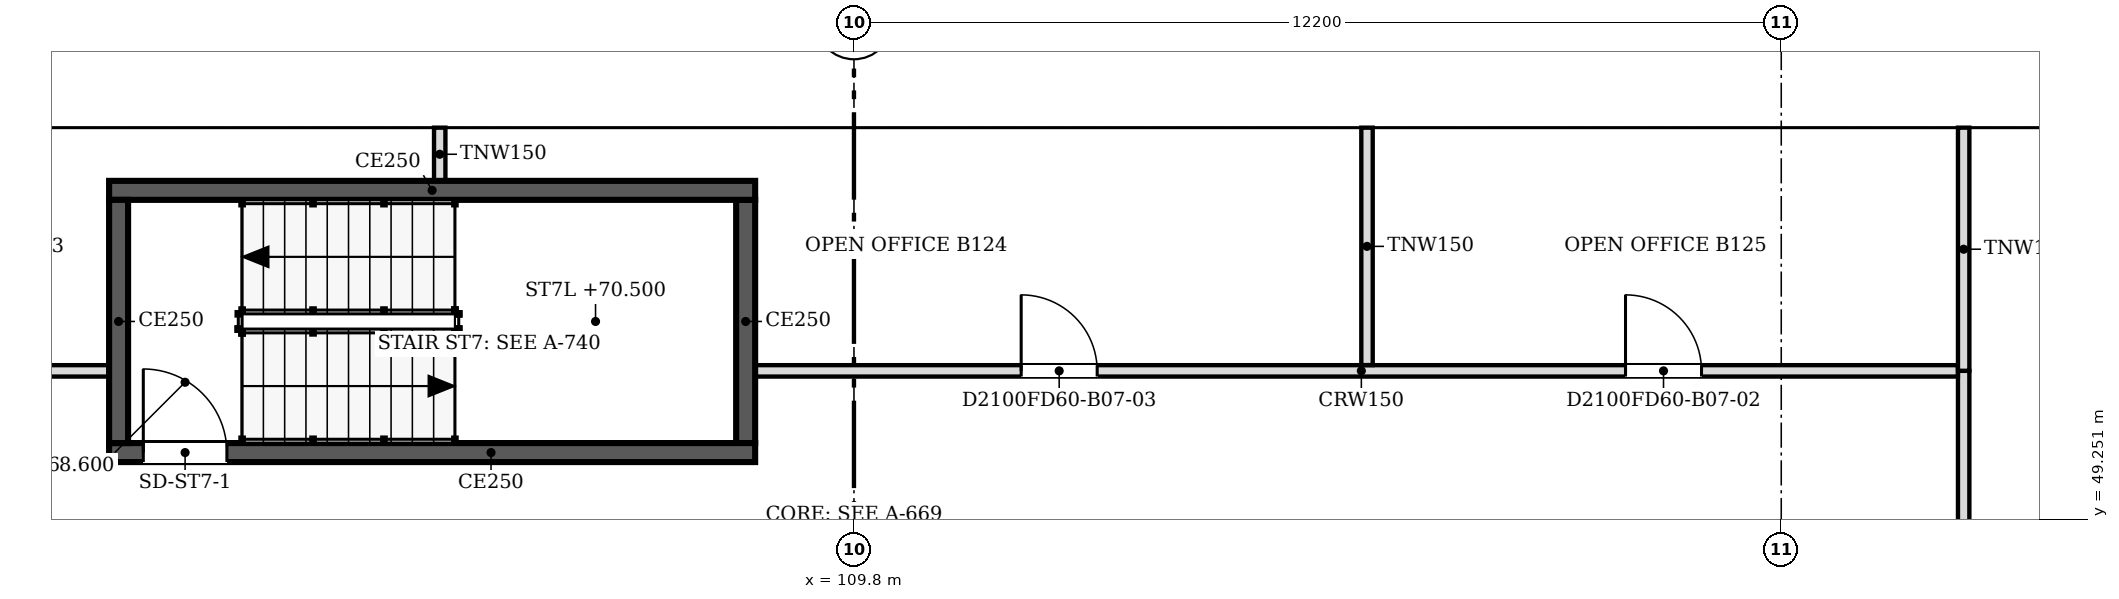
"""IFC4 building model, lengths in metres.
Left out: names, types, materials, properties, quantities, classifications, styles, units other than length and angle.
Written with IfcOpenShell. Run it as: python <this file> out.ifc"""

import sys

from ifc_helpers import new_model, si_unit, direction, frame, frame_2d, origin, place, context, subcontext, project, spatial, polyline, rectangle, outline, extrude, faceted_brep, source, transform, mapped, element, fill, save


model = new_model("IFC4")
c1 = context("Model", 3, precision=1e-05, world=origin(), true_north=direction((0.0, 1.0)))
c2 = subcontext(c1, "Body", "Model", "MODEL_VIEW")
j1 = project(units=[si_unit("LENGTHUNIT", "METRE"), si_unit("PLANEANGLEUNIT", "RADIAN")], contexts=[c1])
p1 = place(None, origin())
s1 = spatial("IfcSite", under=j1, at=p1, CompositionType="ELEMENT")
p2 = place(p1, origin())
s2 = spatial("IfcBuilding", under=s1, at=p2, CompositionType="ELEMENT")
p3 = place(p2, frame((0.0, 0.0, 68.6)))
s3 = spatial("IfcBuildingStorey", under=s2, at=p3, CompositionType="ELEMENT", Elevation=68.6)
m1 = source(origin(), c2, "Body", "Brep", [
    faceted_brep([(3.05, -0.25, 0.0), (0.047, -0.25, 3.8), (0.0, -0.25, 3.74), (0.0, -0.25, 0.0), (0.093, 0.25, 3.741), (3.05, 0.25, 0.0), (0.093, 0.25, 0.0), (0.047, 0.0, 3.8)], [[[0, 1, 2, 3]], [[4, 5, 6]], [[5, 4, 7, 1, 0]], [[2, 1, 7]], [[6, 5, 0, 3]], [[6, 3, 2, 7, 4]]]),
])
p4 = place(p3, frame((128.1, 54.65, 0.0), z_axis=(0.0, 0.0, 1.0), x_axis=(-1.0, 0.0, 0.0)))
e1 = element("IfcWall", 1, at=p4, inside=s3, PredefinedType="SOLIDWALL", context=c2, shape_type="MappedRepresentation", body=[
    mapped(m1, transform((0.0, 0.0, 0.0), scale=1.0)),
])
m2 = source(origin(), c2, "Body", "SweptSolid", [
    extrude(outline(polyline([(2.534, 0.25), (0.247, 3.144), (0.247, 0.25), (2.534, 0.25)])), frame((0.0, 0.26, 0.0), z_axis=(0.0, -1.0, 0.0), x_axis=(1.0, 0.0, 0.0)), (0.0, 0.0, 1.0), 0.52),
])
p5 = place(p4, origin())
e2 = element("IfcOpeningElement", 2, at=p5, cuts=e1, PredefinedType="OPENING", context=c2, shape_type="MappedRepresentation", body=[
    mapped(m2, transform((0.0, 0.0, 0.0), scale=1.0)),
])
m3 = source(origin(), c2, "Body", "SweptSolid", [
    extrude(outline(polyline([(6.1, 0.0), (3.05, 3.8), (0.0, 0.0), (6.1, 0.0)])), frame((0.0, 0.25, 0.0), z_axis=(0.0, -1.0, 0.0), x_axis=(1.0, 0.0, 0.0)), (0.0, 0.0, 1.0), 0.5),
])
p6 = place(p3, frame((125.05, 54.65, 0.0), z_axis=(0.0, 0.0, 1.0), x_axis=(-1.0, 0.0, 0.0)))
e3 = element("IfcWall", 3, at=p6, inside=s3, PredefinedType="SOLIDWALL", context=c2, shape_type="MappedRepresentation", body=[
    mapped(m3, transform((0.0, 0.0, 0.0), scale=1.0)),
])
m4 = source(origin(), c2, "Body", "SweptSolid", [
    extrude(outline(polyline([(5.579, 0.25), (3.05, 3.4), (0.521, 0.25), (5.579, 0.25)])), frame((0.0, 0.26, 0.0), z_axis=(0.0, -1.0, 0.0), x_axis=(1.0, 0.0, 0.0)), (0.0, 0.0, 1.0), 0.52),
])
p7 = place(p6, origin())
e4 = element("IfcOpeningElement", 4, at=p7, cuts=e3, PredefinedType="OPENING", context=c2, shape_type="MappedRepresentation", body=[
    mapped(m4, transform((0.0, 0.0, 0.0), scale=1.0)),
])
m5 = source(origin(), c2, "Body", "Brep", [
    faceted_brep([(6.1, -0.25, 0.0), (3.05, -0.25, 3.8), (0.0, -0.25, 0.0), (6.1, -0.25, 0.0), (0.0, 0.25, 0.0), (3.05, 0.25, 3.8), (6.1, 0.25, 0.0), (6.1, 0.25, 0.0)], [[[0, 1, 2, 3]], [[4, 5, 6, 7]], [[6, 5, 1, 0]], [[5, 4, 2, 1]], [[4, 7, 3, 2]], [[3, 7, 6, 0]]]),
])
p8 = place(p3, frame((118.95, 54.65, 0.0), z_axis=(0.0, 0.0, 1.0), x_axis=(-1.0, 0.0, 0.0)))
e5 = element("IfcWall", 5, at=p8, inside=s3, PredefinedType="SOLIDWALL", context=c2, shape_type="MappedRepresentation", body=[
    mapped(m5, transform((0.0, 0.0, 0.0), scale=1.0)),
])
p9 = place(p8, origin())
e6 = element("IfcOpeningElement", 6, at=p9, cuts=e5, PredefinedType="OPENING", context=c2, shape_type="MappedRepresentation", body=[
    mapped(m4, transform((0.0, 0.0, 0.0), scale=1.0)),
])
p10 = place(p3, frame((112.85, 54.65, 0.0), z_axis=(0.0, 0.0, 1.0), x_axis=(-1.0, 0.0, 0.0)))
e7 = element("IfcWall", 7, at=p10, inside=s3, PredefinedType="SOLIDWALL", context=c2, shape_type="MappedRepresentation", body=[
    mapped(m3, transform((0.0, 0.0, 0.0), scale=1.0)),
])
p11 = place(p10, origin())
e8 = element("IfcOpeningElement", 8, at=p11, cuts=e7, PredefinedType="OPENING", context=c2, shape_type="MappedRepresentation", body=[
    mapped(m4, transform((0.0, 0.0, 0.0), scale=1.0)),
])
p12 = place(p3, frame((106.75, 54.65, 0.0), z_axis=(0.0, 0.0, 1.0), x_axis=(-1.0, 0.0, 0.0)))
e9 = element("IfcWall", 9, at=p12, inside=s3, PredefinedType="SOLIDWALL", context=c2, shape_type="MappedRepresentation", body=[
    mapped(m3, transform((0.0, 0.0, 0.0), scale=1.0)),
])
p13 = place(p12, origin())
e10 = element("IfcOpeningElement", 10, at=p13, cuts=e9, PredefinedType="OPENING", context=c2, shape_type="MappedRepresentation", body=[
    mapped(m4, transform((0.0, 0.0, 0.0), scale=1.0)),
])
p14 = place(p3, frame((100.65, 54.65, 0.0), z_axis=(0.0, 0.0, 1.0), x_axis=(-1.0, 0.0, 0.0)))
e11 = element("IfcWall", 11, at=p14, inside=s3, PredefinedType="SOLIDWALL", context=c2, shape_type="MappedRepresentation", body=[
    mapped(m5, transform((0.0, 0.0, 0.0), scale=1.0)),
])
p15 = place(p14, origin())
e12 = element("IfcOpeningElement", 12, at=p15, cuts=e11, PredefinedType="OPENING", context=c2, shape_type="MappedRepresentation", body=[
    mapped(m4, transform((0.0, 0.0, 0.0), scale=1.0)),
])
p16 = place(p2, frame((0.0, 0.0, 72.4)))
s4 = spatial("IfcBuildingStorey", under=s2, at=p16, CompositionType="ELEMENT", Elevation=72.4)
m6 = source(origin(), c2, "Body", "Brep", [
    faceted_brep([(3.003, -0.25, 0.0), (6.053, -0.25, 3.8), (3.003, -0.25, 7.6), (0.0, -0.25, 3.8), (0.047, 0.25, 3.859), (3.003, 0.25, 7.6), (6.053, 0.25, 3.8), (3.003, 0.25, 0.0), (0.047, 0.25, 3.741), (0.0, 0.0, 3.8)], [[[0, 1, 2, 3]], [[4, 5, 6, 7, 8]], [[7, 6, 1, 0]], [[6, 5, 2, 1]], [[5, 4, 9, 3, 2]], [[8, 7, 0, 3, 9]], [[8, 9, 4]]]),
])
p17 = place(p16, frame((128.053, 54.65, -3.8), z_axis=(0.0, 0.0, 1.0), x_axis=(-1.0, 0.0, 0.0)))
e13 = element("IfcWall", 13, at=p17, inside=s4, PredefinedType="SOLIDWALL", context=c2, shape_type="MappedRepresentation", body=[
    mapped(m6, transform((0.0, 0.0, 0.0), scale=1.0)),
])
m7 = source(origin(), c2, "Body", "SweptSolid", [
    extrude(outline(polyline([(3.005, 0.401), (5.733, 3.8), (3.005, 7.199), (0.319, 3.8), (3.005, 0.401)])), frame((0.0, 0.26, 0.0), z_axis=(0.0, -1.0, 0.0), x_axis=(1.0, 0.0, 0.0)), (0.0, 0.0, 1.0), 0.52),
])
p18 = place(p17, origin())
e14 = element("IfcOpeningElement", 14, at=p18, cuts=e13, PredefinedType="OPENING", context=c2, shape_type="MappedRepresentation", body=[
    mapped(m7, transform((0.0, 0.0, 0.0), scale=1.0)),
])
m8 = source(origin(), c2, "Body", "SweptSolid", [
    extrude(outline(polyline([(3.05, 0.0), (6.1, 3.8), (3.05, 7.6), (0.0, 3.8), (3.05, 0.0)])), frame((0.0, 0.25, 0.0), z_axis=(0.0, -1.0, 0.0), x_axis=(1.0, 0.0, 0.0)), (0.0, 0.0, 1.0), 0.5),
])
p19 = place(p16, frame((122.0, 54.65, -3.8), z_axis=(0.0, 0.0, 1.0), x_axis=(-1.0, 0.0, 0.0)))
e15 = element("IfcWall", 15, at=p19, inside=s4, PredefinedType="SOLIDWALL", context=c2, shape_type="MappedRepresentation", body=[
    mapped(m8, transform((0.0, 0.0, 0.0), scale=1.0)),
])
m9 = source(origin(), c2, "Body", "SweptSolid", [
    extrude(outline(polyline([(3.05, 0.399), (5.78, 3.8), (3.05, 7.2), (0.321, 3.8), (3.05, 0.399)])), frame((0.0, 0.26, 0.0), z_axis=(0.0, -1.0, 0.0), x_axis=(1.0, 0.0, 0.0)), (0.0, 0.0, 1.0), 0.52),
])
p20 = place(p19, origin())
e16 = element("IfcOpeningElement", 16, at=p20, cuts=e15, PredefinedType="OPENING", context=c2, shape_type="MappedRepresentation", body=[
    mapped(m9, transform((0.0, 0.0, 0.0), scale=1.0)),
])
m10 = source(origin(), c2, "Body", "Brep", [
    faceted_brep([(3.05, -0.25, 0.0), (6.1, -0.25, 3.8), (6.1, -0.25, 3.8), (3.05, -0.25, 7.6), (0.0, -0.25, 3.8), (0.0, 0.25, 3.8), (3.05, 0.25, 7.6), (6.1, 0.25, 3.8), (6.1, 0.25, 3.8), (3.05, 0.25, 0.0)], [[[0, 1, 2, 3, 4]], [[5, 6, 7, 8, 9]], [[9, 8, 1, 0]], [[7, 6, 3, 2]], [[6, 5, 4, 3]], [[5, 9, 0, 4]], [[1, 8, 7, 2]]]),
])
p21 = place(p16, frame((115.9, 54.65, -3.8), z_axis=(0.0, 0.0, 1.0), x_axis=(-1.0, 0.0, 0.0)))
e17 = element("IfcWall", 17, at=p21, inside=s4, PredefinedType="SOLIDWALL", context=c2, shape_type="MappedRepresentation", body=[
    mapped(m10, transform((0.0, 0.0, 0.0), scale=1.0)),
])
p22 = place(p21, origin())
e18 = element("IfcOpeningElement", 18, at=p22, cuts=e17, PredefinedType="OPENING", context=c2, shape_type="MappedRepresentation", body=[
    mapped(m9, transform((0.0, 0.0, 0.0), scale=1.0)),
])
p23 = place(p16, frame((109.8, 54.65, -3.8), z_axis=(0.0, 0.0, 1.0), x_axis=(-1.0, 0.0, 0.0)))
e19 = element("IfcWall", 19, at=p23, inside=s4, PredefinedType="SOLIDWALL", context=c2, shape_type="MappedRepresentation", body=[
    mapped(m8, transform((0.0, 0.0, 0.0), scale=1.0)),
])
p24 = place(p23, origin())
e20 = element("IfcOpeningElement", 20, at=p24, cuts=e19, PredefinedType="OPENING", context=c2, shape_type="MappedRepresentation", body=[
    mapped(m9, transform((0.0, 0.0, 0.0), scale=1.0)),
])
p25 = place(p16, frame((103.7, 54.65, -3.8), z_axis=(0.0, 0.0, 1.0), x_axis=(-1.0, 0.0, 0.0)))
e21 = element("IfcWall", 21, at=p25, inside=s4, PredefinedType="SOLIDWALL", context=c2, shape_type="MappedRepresentation", body=[
    mapped(m10, transform((0.0, 0.0, 0.0), scale=1.0)),
])
p26 = place(p25, origin())
e22 = element("IfcOpeningElement", 22, at=p26, cuts=e21, PredefinedType="OPENING", context=c2, shape_type="MappedRepresentation", body=[
    mapped(m9, transform((0.0, 0.0, 0.0), scale=1.0)),
])
p27 = place(p3, frame((108.5, 50.125, 0.0), z_axis=(0.0, 0.0, 1.0), x_axis=(-1.0, 0.0, 0.0)))
e23 = element("IfcWall", 23, at=p27, inside=s3, PredefinedType="SOLIDWALL", context=c2, shape_type="SweptSolid", body=[
    extrude(rectangle(XDim=8.5, YDim=0.25, at=frame_2d((4.25, 0.0))), origin(), (0.0, 0.0, 1.0), 3.8),
])
m11 = source(origin(), c2, "Body", "SweptSolid", [
    extrude(rectangle(XDim=1.1, YDim=2.1, at=frame_2d((0.55, 1.05))), frame((0.0, 0.135, 0.0), z_axis=(0.0, -1.0, 0.0), x_axis=(1.0, 0.0, 0.0)), (0.0, 0.0, 1.0), 0.27),
])
p28 = place(p27, frame((6.95, 0.0, 0.0)))
e24 = element("IfcOpeningElement", 24, at=p28, cuts=e23, PredefinedType="OPENING", context=c2, shape_type="MappedRepresentation", body=[
    mapped(m11, transform((0.0, 0.0, 0.0), scale=1.0)),
])
p29 = place(p3, frame((100.125, 50.25, 0.0), z_axis=(0.0, 0.0, 1.0), x_axis=(0.0, 1.0, 0.0)))
e25 = element("IfcWall", 25, at=p29, inside=s3, PredefinedType="SOLIDWALL", context=c2, shape_type="SweptSolid", body=[
    extrude(rectangle(XDim=3.2, YDim=0.25, at=frame_2d((1.6, 0.0))), origin(), (0.0, 0.0, 1.0), 3.8),
])
p30 = place(p3, frame((100.0, 53.575, 0.0), z_axis=(0.0, 0.0, 1.0), x_axis=(1.0, 0.0, 0.0)))
e26 = element("IfcWall", 26, at=p30, inside=s3, PredefinedType="SOLIDWALL", context=c2, shape_type="SweptSolid", body=[
    extrude(rectangle(XDim=8.5, YDim=0.25, at=frame_2d((4.25, 0.0))), origin(), (0.0, 0.0, 1.0), 3.8),
])
p31 = place(p3, frame((108.375, 53.45, 0.0), z_axis=(0.0, 0.0, 1.0), x_axis=(0.0, -1.0, 0.0)))
e27 = element("IfcWall", 27, at=p31, inside=s3, PredefinedType="SOLIDWALL", context=c2, shape_type="SweptSolid", body=[
    extrude(rectangle(XDim=3.2, YDim=0.25, at=frame_2d((1.6, 0.0))), origin(), (0.0, 0.0, 1.0), 3.8),
])
p32 = place(p3, frame((124.4, 51.2, 0.0), z_axis=(0.0, 0.0, 1.0), x_axis=(0.0, -1.0, 0.0)))
e28 = element("IfcWall", 28, at=p32, inside=s3, PredefinedType="PARTITIONING", context=c2, shape_type="SweptSolid", body=[
    extrude(rectangle(XDim=14.6, YDim=0.15, at=frame_2d((7.3, 0.0))), origin(), (0.0, 0.0, 1.0), 3.067),
])
m12 = source(origin(), c2, "Body", "SweptSolid", [
    extrude(rectangle(XDim=0.9, YDim=2.1, at=frame_2d((0.45, 1.05))), frame((0.0, 0.085, 0.0), z_axis=(0.0, -1.0, 0.0), x_axis=(1.0, 0.0, 0.0)), (0.0, 0.0, 1.0), 0.17),
])
p33 = place(p32, frame((3.9, 0.0, 0.0)))
e29 = element("IfcOpeningElement", 29, at=p33, cuts=e28, PredefinedType="OPENING", context=c2, shape_type="MappedRepresentation", body=[
    mapped(m12, transform((0.0, 0.0, 0.0), scale=1.0)),
])
m13 = source(origin(), c2, "Body", "SweptSolid", [
    extrude(rectangle(XDim=1.8, YDim=2.1, at=frame_2d((0.9, 1.05))), frame((0.0, 0.085, 0.0), z_axis=(0.0, -1.0, 0.0), x_axis=(1.0, 0.0, 0.0)), (0.0, 0.0, 1.0), 0.17),
])
p34 = place(p32, frame((10.7, 0.0, 0.0)))
e30 = element("IfcOpeningElement", 30, at=p34, cuts=e28, PredefinedType="OPENING", context=c2, shape_type="MappedRepresentation", body=[
    mapped(m13, transform((0.0, 0.0, 0.0), scale=1.0)),
])
p35 = place(p3, frame((95.276, 51.2, 0.0), z_axis=(0.0, 0.0, 1.0), x_axis=(1.0, 0.0, 0.0)))
e31 = element("IfcWall", 31, at=p35, inside=s3, PredefinedType="PARTITIONING", context=c2, shape_type="SweptSolid", body=[
    extrude(rectangle(XDim=4.724, YDim=0.15, at=frame_2d((2.362, 0.0))), origin(), (0.0, 0.0, 1.0), 3.067),
])
m14 = source(origin(), c2, "Body", "SweptSolid", [
    extrude(rectangle(XDim=1.0, YDim=2.1, at=frame_2d((0.5, 1.05))), frame((0.0, 0.085, 0.0), z_axis=(0.0, -1.0, 0.0), x_axis=(1.0, 0.0, 0.0)), (0.0, 0.0, 1.0), 0.17),
])
p36 = place(p35, frame((1.9, 0.0, 0.0)))
e32 = element("IfcOpeningElement", 32, at=p36, cuts=e31, PredefinedType="OPENING", context=c2, shape_type="MappedRepresentation", body=[
    mapped(m14, transform((0.0, 0.0, 0.0), scale=1.0)),
])
p37 = place(p3, frame((108.5, 51.2, 0.0), z_axis=(0.0, 0.0, 1.0), x_axis=(1.0, 0.0, 0.0)))
e33 = element("IfcWall", 33, at=p37, inside=s3, PredefinedType="PARTITIONING", context=c2, shape_type="SweptSolid", body=[
    extrude(rectangle(XDim=15.824, YDim=0.15, at=frame_2d((7.912, 0.0))), origin(), (0.0, 0.0, 1.0), 3.067),
])
p38 = place(p37, frame((11.451, 0.0, 0.0)))
e34 = element("IfcOpeningElement", 34, at=p38, cuts=e33, PredefinedType="OPENING", context=c2, shape_type="MappedRepresentation", body=[
    mapped(m14, transform((0.0, 0.0, 0.0), scale=1.0)),
])
p39 = place(p37, frame((3.5, 0.0, 0.0)))
e35 = element("IfcOpeningElement", 35, at=p39, cuts=e33, PredefinedType="OPENING", context=c2, shape_type="MappedRepresentation", body=[
    mapped(m14, transform((0.0, 0.0, 0.0), scale=1.0)),
])
p40 = place(p3, frame((124.4, 51.201, 0.0), z_axis=(0.0, 0.0, 1.0), x_axis=(0.0, 1.0, 0.0)))
e36 = element("IfcWall", 36, at=p40, inside=s3, PredefinedType="PARTITIONING", context=c2, shape_type="SweptSolid", body=[
    extrude(rectangle(XDim=3.199, YDim=0.15, at=frame_2d((1.6, 0.0))), origin(), (0.0, 0.0, 1.0), 3.067),
])
p41 = place(p3, frame((116.55, 51.276, 0.0), z_axis=(0.0, 0.0, 1.0), x_axis=(0.0, 1.0, 0.0)))
e37 = element("IfcWall", 37, at=p41, inside=s3, PredefinedType="PARTITIONING", context=c2, shape_type="SweptSolid", body=[
    extrude(rectangle(XDim=3.124, YDim=0.15, at=frame_2d((1.562, 0.0))), origin(), (0.0, 0.0, 1.0), 3.067),
])
p42 = place(p3, frame((104.35, 53.7, 0.0), z_axis=(0.0, 0.0, 1.0), x_axis=(0.0, 1.0, 0.0)))
e38 = element("IfcWall", 38, at=p42, inside=s3, PredefinedType="PARTITIONING", context=c2, shape_type="SweptSolid", body=[
    extrude(rectangle(XDim=0.7, YDim=0.15, at=frame_2d((0.35, 0.0))), origin(), (0.0, 0.0, 1.0), 3.067),
])
m15 = source(origin(), c2, "Body", "SweptSolid", [
    extrude(rectangle(XDim=1.1, YDim=2.1, at=frame_2d((0.55, 1.05))), frame((0.0, 0.025, 0.0), z_axis=(0.0, -1.0, 0.0), x_axis=(1.0, 0.0, 0.0)), (0.0, 0.0, 1.0), 0.05),
])
p43 = place(p28, origin())
e39 = element("IfcDoor", 39, at=p43, inside=s3, OperationType="SINGLE_SWING_RIGHT", PredefinedType="DOOR", context=c2, shape_type="MappedRepresentation", body=[
    mapped(m15, transform((0.0, 0.0, 0.0), scale=1.0)),
])
fill(e24, e39)
m16 = source(origin(), c2, "Body", "SweptSolid", [
    extrude(rectangle(XDim=1.0, YDim=2.1, at=frame_2d((0.5, 1.05))), frame((0.0, 0.025, 0.0), z_axis=(0.0, -1.0, 0.0), x_axis=(1.0, 0.0, 0.0)), (0.0, 0.0, 1.0), 0.05),
])
p44 = place(p38, origin())
e40 = element("IfcDoor", 40, at=p44, inside=s3, OperationType="SINGLE_SWING_LEFT", PredefinedType="DOOR", context=c2, shape_type="MappedRepresentation", body=[
    mapped(m16, transform((0.0, 0.0, 0.0), scale=1.0)),
])
fill(e34, e40)
p45 = place(p39, origin())
e41 = element("IfcDoor", 41, at=p45, inside=s3, OperationType="SINGLE_SWING_LEFT", PredefinedType="DOOR", context=c2, shape_type="MappedRepresentation", body=[
    mapped(m16, transform((0.0, 0.0, 0.0), scale=1.0)),
])
fill(e35, e41)
save(model, sys.argv[1])
